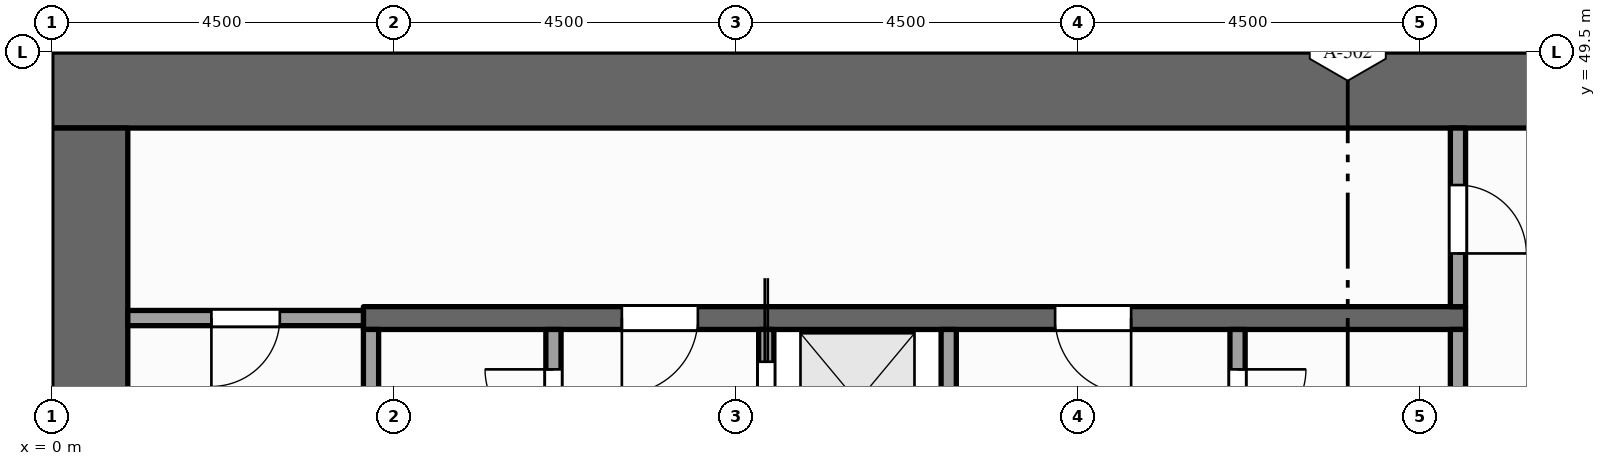
"""IFC4 building model, lengths in metres.
Left out: names, types, materials, properties, quantities, classifications, styles, units other than length and angle.
Written with IfcOpenShell. Run it as: python <this file> out.ifc"""

import sys

from ifc_helpers import new_model, si_unit, direction, frame, frame_2d, origin, place, context, subcontext, project, spatial, rectangle, extrude, element, fill, save


model = new_model("IFC4")
c1 = context("Model", 3, precision=1e-05, world=origin(), true_north=direction((0.0, 1.0)))
c2 = subcontext(c1, "Body", "Model", "MODEL_VIEW")
j1 = project(units=[si_unit("LENGTHUNIT", "METRE"), si_unit("PLANEANGLEUNIT", "RADIAN")], contexts=[c1])
p1 = place(None, origin())
s1 = spatial("IfcSite", under=j1, at=p1, CompositionType="ELEMENT")
p2 = place(p1, origin())
s2 = spatial("IfcBuilding", under=s1, at=p2, CompositionType="ELEMENT")
p3 = place(p2, frame((0.0, 0.0, 211.0)))
s3 = spatial("IfcBuildingStorey", under=s2, at=p3, CompositionType="ELEMENT", Elevation=211.0)
p4 = place(p3, frame((0.0, 49.0, -0.15), z_axis=(0.0, 0.0, 1.0), x_axis=(1.0, 0.0, 0.0)))
e1 = element("IfcWall", 1, at=p4, inside=s3, PredefinedType="SHEAR", context=c2, shape_type="SweptSolid", body=[
    extrude(rectangle(XDim=22.5, YDim=1.0, at=frame_2d((11.25, 0.0))), origin(), (0.0, 0.0, 1.0), 4.0),
])
p5 = place(p3, frame((0.5, 37.0, -0.15), z_axis=(0.0, 0.0, 1.0), x_axis=(0.0, 1.0, 0.0)))
e2 = element("IfcWall", 2, at=p5, inside=s3, PredefinedType="SHEAR", context=c2, shape_type="SweptSolid", body=[
    extrude(rectangle(XDim=11.5, YDim=1.0, at=frame_2d((5.75, 0.0))), origin(), (0.0, 0.0, 1.0), 4.0),
])
p6 = place(p3, frame((4.2, 43.525, 0.0), z_axis=(0.0, 0.0, 1.0), x_axis=(0.0, 1.0, 0.0)))
e3 = element("IfcWall", 3, at=p6, inside=s3, PredefinedType="PARTITIONING", context=c2, shape_type="SweptSolid", body=[
    extrude(rectangle(XDim=2.325, YDim=0.2, at=frame_2d((1.163, 0.0))), origin(), (0.0, 0.0, 1.0), 3.85),
])
p7 = place(p3, frame((6.6, 37.0, 0.0), z_axis=(0.0, 0.0, 1.0), x_axis=(0.0, 1.0, 0.0)))
e4 = element("IfcWall", 4, at=p7, inside=s3, PredefinedType="PARTITIONING", context=c2, shape_type="SweptSolid", body=[
    extrude(rectangle(XDim=8.85, YDim=0.2, at=frame_2d((4.425, 0.0))), origin(), (0.0, 0.0, 1.0), 3.85),
])
p8 = place(p7, frame((0.7, 0.0, 0.0)))
e5 = element("IfcOpeningElement", 5, at=p8, cuts=e4, PredefinedType="OPENING", context=c2, shape_type="SweptSolid", body=[
    extrude(rectangle(XDim=0.9, YDim=2.1, at=frame_2d((0.45, 1.05))), frame((0.0, 0.11, 0.0), z_axis=(0.0, -1.0, 0.0), x_axis=(1.0, 0.0, 0.0)), (0.0, 0.0, 1.0), 0.22),
])
p9 = place(p7, frame((4.15, 0.0, 0.0)))
e6 = element("IfcOpeningElement", 6, at=p9, cuts=e4, PredefinedType="OPENING", context=c2, shape_type="SweptSolid", body=[
    extrude(rectangle(XDim=0.9, YDim=2.1, at=frame_2d((0.45, 1.05))), frame((0.0, 0.11, 0.0), z_axis=(0.0, -1.0, 0.0), x_axis=(1.0, 0.0, 0.0)), (0.0, 0.0, 1.0), 0.22),
])
p10 = place(p7, frame((7.425, 0.0, 0.0)))
e7 = element("IfcOpeningElement", 7, at=p10, cuts=e4, PredefinedType="OPENING", context=c2, shape_type="SweptSolid", body=[
    extrude(rectangle(XDim=0.9, YDim=2.1, at=frame_2d((0.45, 1.05))), frame((0.0, 0.11, 0.0), z_axis=(0.0, -1.0, 0.0), x_axis=(1.0, 0.0, 0.0)), (0.0, 0.0, 1.0), 0.22),
])
p11 = place(p3, frame((9.4, 37.0, 0.0), z_axis=(0.0, 0.0, 1.0), x_axis=(0.0, 1.0, 0.0)))
e8 = element("IfcWall", 8, at=p11, inside=s3, PredefinedType="SOLIDWALL", context=c2, shape_type="SweptSolid", body=[
    extrude(rectangle(XDim=8.85, YDim=0.2, at=frame_2d((4.425, 0.0))), origin(), (0.0, 0.0, 1.0), 3.85),
])
p12 = place(p11, frame((0.6, 0.0, 0.012)))
e9 = element("IfcOpeningElement", 9, at=p12, cuts=e8, PredefinedType="OPENING", context=c2, shape_type="SweptSolid", body=[
    extrude(rectangle(XDim=1.1, YDim=2.1, at=frame_2d((0.55, 1.05))), frame((0.0, 0.11, 0.0), z_axis=(0.0, -1.0, 0.0), x_axis=(1.0, 0.0, 0.0)), (0.0, 0.0, 1.0), 0.22),
])
p13 = place(p11, frame((2.95, 0.0, 0.012)))
e10 = element("IfcOpeningElement", 10, at=p13, cuts=e8, PredefinedType="OPENING", context=c2, shape_type="SweptSolid", body=[
    extrude(rectangle(XDim=1.1, YDim=2.1, at=frame_2d((0.55, 1.05))), frame((0.0, 0.11, 0.0), z_axis=(0.0, -1.0, 0.0), x_axis=(1.0, 0.0, 0.0)), (0.0, 0.0, 1.0), 0.22),
])
p14 = place(p11, frame((5.15, 0.0, 0.012)))
e11 = element("IfcOpeningElement", 11, at=p14, cuts=e8, PredefinedType="OPENING", context=c2, shape_type="SweptSolid", body=[
    extrude(rectangle(XDim=1.1, YDim=2.1, at=frame_2d((0.55, 1.05))), frame((0.0, 0.11, 0.0), z_axis=(0.0, -1.0, 0.0), x_axis=(1.0, 0.0, 0.0)), (0.0, 0.0, 1.0), 0.22),
])
p15 = place(p11, frame((7.325, 0.0, 0.012)))
e12 = element("IfcOpeningElement", 12, at=p15, cuts=e8, PredefinedType="OPENING", context=c2, shape_type="SweptSolid", body=[
    extrude(rectangle(XDim=1.1, YDim=2.1, at=frame_2d((0.55, 1.05))), frame((0.0, 0.11, 0.0), z_axis=(0.0, -1.0, 0.0), x_axis=(1.0, 0.0, 0.0)), (0.0, 0.0, 1.0), 0.22),
])
p16 = place(p3, frame((11.8, 37.0, 0.0), z_axis=(0.0, 0.0, 1.0), x_axis=(0.0, 1.0, 0.0)))
e13 = element("IfcWall", 13, at=p16, inside=s3, PredefinedType="SOLIDWALL", context=c2, shape_type="SweptSolid", body=[
    extrude(rectangle(XDim=8.85, YDim=0.2, at=frame_2d((4.425, 0.0))), origin(), (0.0, 0.0, 1.0), 3.85),
])
p17 = place(p3, frame((15.6, 43.9, 0.0), z_axis=(0.0, 0.0, 1.0), x_axis=(0.0, 1.0, 0.0)))
e14 = element("IfcWall", 14, at=p17, inside=s3, PredefinedType="PARTITIONING", context=c2, shape_type="SweptSolid", body=[
    extrude(rectangle(XDim=1.95, YDim=0.2, at=frame_2d((0.975, 0.0))), origin(), (0.0, 0.0, 1.0), 3.85),
])
p18 = place(p17, frame((0.525, 0.0, 0.0)))
e15 = element("IfcOpeningElement", 15, at=p18, cuts=e14, PredefinedType="OPENING", context=c2, shape_type="SweptSolid", body=[
    extrude(rectangle(XDim=0.9, YDim=2.1, at=frame_2d((0.45, 1.05))), frame((0.0, 0.11, 0.0), z_axis=(0.0, -1.0, 0.0), x_axis=(1.0, 0.0, 0.0)), (0.0, 0.0, 1.0), 0.22),
])
p19 = place(p3, frame((18.5, 43.9, 0.0), z_axis=(0.0, 0.0, 1.0), x_axis=(0.0, 1.0, 0.0)))
e16 = element("IfcWall", 16, at=p19, inside=s3, PredefinedType="PARTITIONING", context=c2, shape_type="SweptSolid", body=[
    extrude(rectangle(XDim=1.95, YDim=0.2, at=frame_2d((0.975, 0.0))), origin(), (0.0, 0.0, 1.0), 3.85),
])
p20 = place(p3, frame((18.5, 46.15, 0.0), z_axis=(0.0, 0.0, 1.0), x_axis=(0.0, 1.0, 0.0)))
e17 = element("IfcWall", 17, at=p20, inside=s3, PredefinedType="PARTITIONING", context=c2, shape_type="SweptSolid", body=[
    extrude(rectangle(XDim=2.35, YDim=0.2, at=frame_2d((1.175, 0.0))), origin(), (0.0, 0.0, 1.0), 3.85),
])
p21 = place(p20, frame((0.7, 0.0, 0.0)))
e18 = element("IfcOpeningElement", 18, at=p21, cuts=e17, PredefinedType="OPENING", context=c2, shape_type="SweptSolid", body=[
    extrude(rectangle(XDim=0.9, YDim=2.1, at=frame_2d((0.45, 1.05))), frame((0.0, 0.11, 0.0), z_axis=(0.0, -1.0, 0.0), x_axis=(1.0, 0.0, 0.0)), (0.0, 0.0, 1.0), 0.22),
])
p22 = place(p3, frame((1.0, 46.0, 0.0), z_axis=(0.0, 0.0, 1.0), x_axis=(1.0, 0.0, 0.0)))
e19 = element("IfcWall", 19, at=p22, inside=s3, PredefinedType="PARTITIONING", context=c2, shape_type="SweptSolid", body=[
    extrude(rectangle(XDim=3.1, YDim=0.2, at=frame_2d((1.55, 0.0))), origin(), (0.0, 0.0, 1.0), 3.85),
])
p23 = place(p22, frame((1.1, 0.0, 0.0)))
e20 = element("IfcOpeningElement", 20, at=p23, cuts=e19, PredefinedType="OPENING", context=c2, shape_type="SweptSolid", body=[
    extrude(rectangle(XDim=0.9, YDim=2.1, at=frame_2d((0.45, 1.05))), frame((0.0, 0.11, 0.0), z_axis=(0.0, -1.0, 0.0), x_axis=(1.0, 0.0, 0.0)), (0.0, 0.0, 1.0), 0.22),
])
p24 = place(p3, frame((4.1, 46.0, 0.0), z_axis=(0.0, 0.0, 1.0), x_axis=(1.0, 0.0, 0.0)))
e21 = element("IfcWall", 21, at=p24, inside=s3, PredefinedType="SHEAR", context=c2, shape_type="SweptSolid", body=[
    extrude(rectangle(XDim=14.5, YDim=0.3, at=frame_2d((7.25, 0.0))), origin(), (0.0, 0.0, 1.0), 3.85),
])
p25 = place(p24, frame((3.4, 0.0, 0.0)))
e22 = element("IfcOpeningElement", 22, at=p25, cuts=e21, PredefinedType="OPENING", context=c2, shape_type="SweptSolid", body=[
    extrude(rectangle(XDim=1.0, YDim=2.1, at=frame_2d((0.5, 1.05))), frame((0.0, 0.16, 0.0), z_axis=(0.0, -1.0, 0.0), x_axis=(1.0, 0.0, 0.0)), (0.0, 0.0, 1.0), 0.32),
])
p26 = place(p24, frame((9.1, 0.0, 0.0)))
e23 = element("IfcOpeningElement", 23, at=p26, cuts=e21, PredefinedType="OPENING", context=c2, shape_type="SweptSolid", body=[
    extrude(rectangle(XDim=1.0, YDim=2.1, at=frame_2d((0.5, 1.05))), frame((0.0, 0.16, 0.0), z_axis=(0.0, -1.0, 0.0), x_axis=(1.0, 0.0, 0.0)), (0.0, 0.0, 1.0), 0.32),
])
p27 = place(p15, origin())
e24 = element("IfcDoor", 24, at=p27, inside=s3, OperationType="SLIDING_TO_RIGHT", PredefinedType="DOOR", context=c2, shape_type="SweptSolid", body=[
    extrude(rectangle(XDim=1.1, YDim=2.1, at=frame_2d((0.55, 1.05))), frame((0.0, 0.025, 0.0), z_axis=(0.0, -1.0, 0.0), x_axis=(1.0, 0.0, 0.0)), (0.0, 0.0, 1.0), 0.05),
])
fill(e12, e24)
p28 = place(p25, origin())
e25 = element("IfcDoor", 25, at=p28, inside=s3, OperationType="SINGLE_SWING_LEFT", PredefinedType="DOOR", context=c2, shape_type="SweptSolid", body=[
    extrude(rectangle(XDim=1.0, YDim=2.1, at=frame_2d((0.5, 1.05))), frame((0.0, 0.025, 0.0), z_axis=(0.0, -1.0, 0.0), x_axis=(1.0, 0.0, 0.0)), (0.0, 0.0, 1.0), 0.05),
])
fill(e22, e25)
p29 = place(p26, origin())
e26 = element("IfcDoor", 26, at=p29, inside=s3, OperationType="SINGLE_SWING_RIGHT", PredefinedType="DOOR", context=c2, shape_type="SweptSolid", body=[
    extrude(rectangle(XDim=1.0, YDim=2.1, at=frame_2d((0.5, 1.05))), frame((0.0, 0.025, 0.0), z_axis=(0.0, -1.0, 0.0), x_axis=(1.0, 0.0, 0.0)), (0.0, 0.0, 1.0), 0.05),
])
fill(e23, e26)
p30 = place(p23, origin())
e27 = element("IfcDoor", 27, at=p30, inside=s3, OperationType="SINGLE_SWING_LEFT", PredefinedType="DOOR", context=c2, shape_type="SweptSolid", body=[
    extrude(rectangle(XDim=0.9, YDim=2.1, at=frame_2d((0.45, 1.05))), frame((0.0, 0.025, 0.0), z_axis=(0.0, -1.0, 0.0), x_axis=(1.0, 0.0, 0.0)), (0.0, 0.0, 1.0), 0.05),
])
fill(e20, e27)
p31 = place(p21, origin())
e28 = element("IfcDoor", 28, at=p31, inside=s3, OperationType="SINGLE_SWING_LEFT", PredefinedType="DOOR", context=c2, shape_type="SweptSolid", body=[
    extrude(rectangle(XDim=0.9, YDim=2.1, at=frame_2d((0.45, 1.05))), frame((0.0, 0.025, 0.0), z_axis=(0.0, -1.0, 0.0), x_axis=(1.0, 0.0, 0.0)), (0.0, 0.0, 1.0), 0.05),
])
fill(e18, e28)
p32 = place(p10, origin())
e29 = element("IfcDoor", 29, at=p32, inside=s3, OperationType="SINGLE_SWING_RIGHT", PredefinedType="DOOR", context=c2, shape_type="SweptSolid", body=[
    extrude(rectangle(XDim=0.9, YDim=2.1, at=frame_2d((0.45, 1.05))), frame((0.0, 0.025, 0.0), z_axis=(0.0, -1.0, 0.0), x_axis=(1.0, 0.0, 0.0)), (0.0, 0.0, 1.0), 0.05),
])
fill(e7, e29)
p33 = place(p18, origin())
e30 = element("IfcDoor", 30, at=p33, inside=s3, OperationType="SINGLE_SWING_RIGHT", PredefinedType="DOOR", context=c2, shape_type="SweptSolid", body=[
    extrude(rectangle(XDim=0.9, YDim=2.1, at=frame_2d((0.45, 1.05))), frame((0.0, 0.025, 0.0), z_axis=(0.0, -1.0, 0.0), x_axis=(1.0, 0.0, 0.0)), (0.0, 0.0, 1.0), 0.05),
])
fill(e15, e30)
save(model, sys.argv[1])
